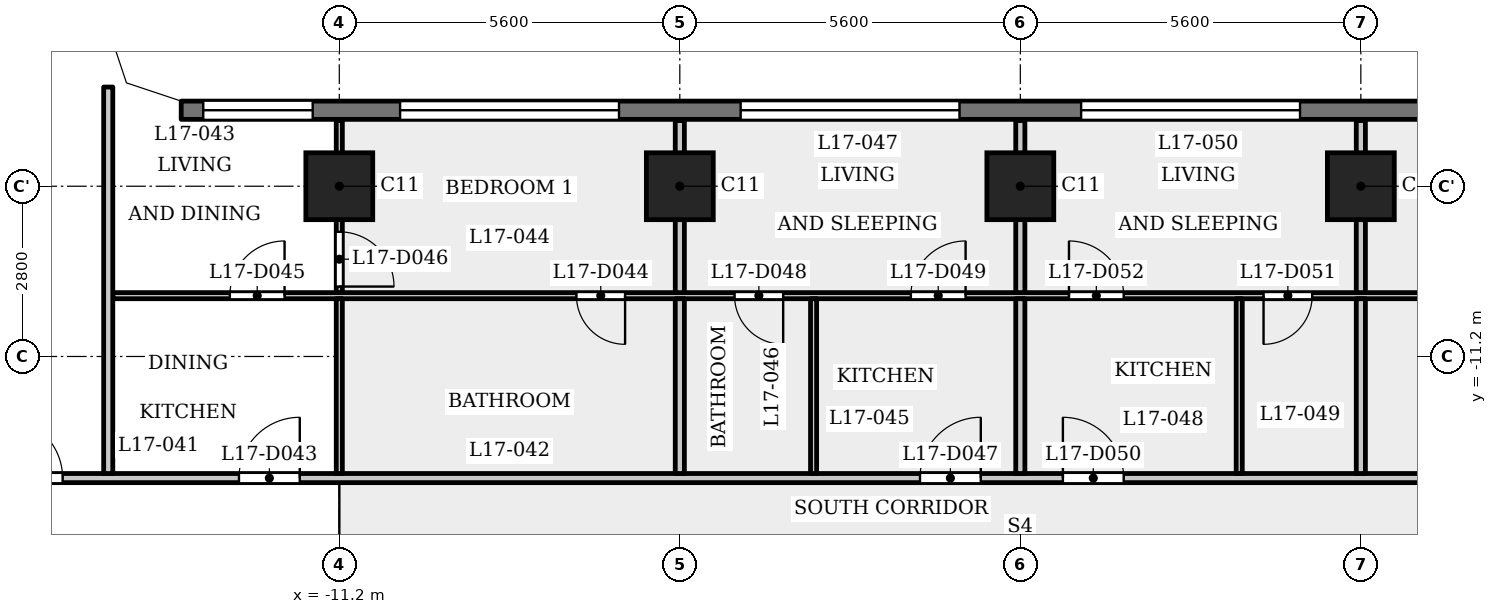
"""IFC4 building model, lengths in metres.
Left out: names, types, materials, properties, quantities, classifications, styles, units other than length and angle.
Written with IfcOpenShell. Run it as: python <this file> out.ifc"""

import sys

from ifc_helpers import new_model, si_unit, direction, frame, frame_2d, origin, origin_2d, place, context, subcontext, project, spatial, polyline, rectangle, outline, extrude, element, fill, save


model = new_model("IFC4")
c1 = context("Model", 3, precision=1e-05, world=origin(), true_north=direction((0.0, 1.0)))
c2 = subcontext(c1, "Body", "Model", "MODEL_VIEW")
j1 = project(units=[si_unit("LENGTHUNIT", "METRE"), si_unit("PLANEANGLEUNIT", "RADIAN")], contexts=[c1])
p1 = place(None, origin())
s1 = spatial("IfcSite", under=j1, at=p1, CompositionType="ELEMENT")
p2 = place(p1, origin())
s2 = spatial("IfcBuilding", under=s1, at=p2, CompositionType="ELEMENT")
p3 = place(p2, frame((0.0, 0.0, 69.0)))
s3 = spatial("IfcBuildingStorey", under=s2, at=p3, CompositionType="ELEMENT", Elevation=69.0)
for number, where, z_axis, x_axis in (
    (1, (-11.2, -8.4, 0.0), (0.0, 0.0, 1.0), (1.0, 0.0, 0.0)),
    (2, (-5.6, -8.4, 0.0), (0.0, 0.0, 1.0), (1.0, 0.0, 0.0)),
    (3, (0.0, -8.4, 0.0), (0.0, 0.0, 1.0), (1.0, 0.0, 0.0)),
    (4, (5.6, -8.4, 0.0), (0.0, 0.0, 1.0), (1.0, 0.0, 0.0)),
):
    element("IfcColumn", number, at=place(p3, frame(where, z_axis=z_axis, x_axis=x_axis)), inside=s3, PredefinedType="COLUMN", context=c2, shape_type="SweptSolid", body=[
        extrude(rectangle(XDim=1.1, YDim=1.1, at=origin_2d()), origin(), (0.0, 0.0, 1.0), 3.5),
    ])
p4 = place(p3, frame((13.8, -7.15, 0.0), z_axis=(0.0, 0.0, 1.0), x_axis=(-1.0, 0.0, 0.0)))
e5 = element("IfcWall", 5, at=p4, inside=s3, PredefinedType="SOLIDWALL", context=c2, shape_type="SweptSolid", body=[
    extrude(rectangle(XDim=27.6, YDim=0.3, at=frame_2d((13.8, 0.0))), origin(), (0.0, 0.0, 1.0), 3.15),
])
p5 = place(p4, frame((0.363, 0.0, 0.9)))
e6 = element("IfcOpeningElement", 6, at=p5, cuts=e5, PredefinedType="OPENING", context=c2, shape_type="SweptSolid", body=[
    extrude(rectangle(XDim=1.8, YDim=1.25, at=frame_2d((0.9, 0.625))), frame((0.0, 0.16, 0.0), z_axis=(0.0, -1.0, 0.0), x_axis=(1.0, 0.0, 0.0)), (0.0, 0.0, 1.0), 0.32),
])
p6 = place(p4, frame((3.6, 0.0, 1.2)))
e7 = element("IfcOpeningElement", 7, at=p6, cuts=e5, PredefinedType="OPENING", context=c2, shape_type="SweptSolid", body=[
    extrude(rectangle(XDim=3.6, YDim=0.95, at=frame_2d((1.8, 0.475))), frame((0.0, 0.16, 0.0), z_axis=(0.0, -1.0, 0.0), x_axis=(1.0, 0.0, 0.0)), (0.0, 0.0, 1.0), 0.32),
])
p7 = place(p4, frame((9.2, 0.0, 1.2)))
e8 = element("IfcOpeningElement", 8, at=p7, cuts=e5, PredefinedType="OPENING", context=c2, shape_type="SweptSolid", body=[
    extrude(rectangle(XDim=3.6, YDim=0.95, at=frame_2d((1.8, 0.475))), frame((0.0, 0.16, 0.0), z_axis=(0.0, -1.0, 0.0), x_axis=(1.0, 0.0, 0.0)), (0.0, 0.0, 1.0), 0.32),
])
p8 = place(p4, frame((14.8, 0.0, 1.2)))
e9 = element("IfcOpeningElement", 9, at=p8, cuts=e5, PredefinedType="OPENING", context=c2, shape_type="SweptSolid", body=[
    extrude(rectangle(XDim=3.6, YDim=0.95, at=frame_2d((1.8, 0.475))), frame((0.0, 0.16, 0.0), z_axis=(0.0, -1.0, 0.0), x_axis=(1.0, 0.0, 0.0)), (0.0, 0.0, 1.0), 0.32),
])
p9 = place(p4, frame((20.4, 0.0, 1.2)))
e10 = element("IfcOpeningElement", 10, at=p9, cuts=e5, PredefinedType="OPENING", context=c2, shape_type="SweptSolid", body=[
    extrude(rectangle(XDim=3.6, YDim=0.95, at=frame_2d((1.8, 0.475))), frame((0.0, 0.16, 0.0), z_axis=(0.0, -1.0, 0.0), x_axis=(1.0, 0.0, 0.0)), (0.0, 0.0, 1.0), 0.32),
])
p10 = place(p4, frame((25.438, 0.0, 0.9)))
e11 = element("IfcOpeningElement", 11, at=p10, cuts=e5, PredefinedType="OPENING", context=c2, shape_type="SweptSolid", body=[
    extrude(rectangle(XDim=1.8, YDim=1.25, at=frame_2d((0.9, 0.625))), frame((0.0, 0.16, 0.0), z_axis=(0.0, -1.0, 0.0), x_axis=(1.0, 0.0, 0.0)), (0.0, 0.0, 1.0), 0.32),
])
p11 = place(p3, frame((-17.4, -13.2, 0.0), z_axis=(0.0, 0.0, 1.0), x_axis=(1.0, 0.0, 0.0)))
e12 = element("IfcWall", 12, at=p11, inside=s3, PredefinedType="PARTITIONING", context=c2, shape_type="SweptSolid", body=[
    extrude(rectangle(XDim=34.8, YDim=0.15, at=frame_2d((17.4, 0.0))), origin(), (0.0, 0.0, 1.0), 3.15),
])
p12 = place(p11, frame((0.65, 0.0, 0.0)))
e13 = element("IfcOpeningElement", 13, at=p12, cuts=e12, PredefinedType="OPENING", context=c2, shape_type="SweptSolid", body=[
    extrude(rectangle(XDim=1.0, YDim=2.1, at=frame_2d((0.5, 1.05))), frame((0.0, 0.085, 0.0), z_axis=(0.0, -1.0, 0.0), x_axis=(1.0, 0.0, 0.0)), (0.0, 0.0, 1.0), 0.17),
])
p13 = place(p11, frame((33.05, 0.0, 0.0)))
e14 = element("IfcOpeningElement", 14, at=p13, cuts=e12, PredefinedType="OPENING", context=c2, shape_type="SweptSolid", body=[
    extrude(rectangle(XDim=1.0, YDim=2.1, at=frame_2d((0.5, 1.05))), frame((0.0, 0.085, 0.0), z_axis=(0.0, -1.0, 0.0), x_axis=(1.0, 0.0, 0.0)), (0.0, 0.0, 1.0), 0.17),
])
p14 = place(p11, frame((4.55, 0.0, 0.0)))
e15 = element("IfcOpeningElement", 15, at=p14, cuts=e12, PredefinedType="OPENING", context=c2, shape_type="SweptSolid", body=[
    extrude(rectangle(XDim=1.0, YDim=2.1, at=frame_2d((0.5, 1.05))), frame((0.0, 0.085, 0.0), z_axis=(0.0, -1.0, 0.0), x_axis=(1.0, 0.0, 0.0)), (0.0, 0.0, 1.0), 0.17),
])
p15 = place(p11, frame((15.75, 0.0, 0.0)))
e16 = element("IfcOpeningElement", 16, at=p15, cuts=e12, PredefinedType="OPENING", context=c2, shape_type="SweptSolid", body=[
    extrude(rectangle(XDim=1.0, YDim=2.1, at=frame_2d((0.5, 1.05))), frame((0.0, 0.085, 0.0), z_axis=(0.0, -1.0, 0.0), x_axis=(1.0, 0.0, 0.0)), (0.0, 0.0, 1.0), 0.17),
])
p16 = place(p11, frame((18.1, 0.0, 0.0)))
e17 = element("IfcOpeningElement", 17, at=p16, cuts=e12, PredefinedType="OPENING", context=c2, shape_type="SweptSolid", body=[
    extrude(rectangle(XDim=1.0, YDim=2.1, at=frame_2d((0.5, 1.05))), frame((0.0, 0.085, 0.0), z_axis=(0.0, -1.0, 0.0), x_axis=(1.0, 0.0, 0.0)), (0.0, 0.0, 1.0), 0.17),
])
p17 = place(p11, frame((26.95, 0.0, 0.0)))
e18 = element("IfcOpeningElement", 18, at=p17, cuts=e12, PredefinedType="OPENING", context=c2, shape_type="SweptSolid", body=[
    extrude(rectangle(XDim=1.0, YDim=2.1, at=frame_2d((0.5, 1.05))), frame((0.0, 0.085, 0.0), z_axis=(0.0, -1.0, 0.0), x_axis=(1.0, 0.0, 0.0)), (0.0, 0.0, 1.0), 0.17),
])
p18 = place(p3, frame((-14.925, -10.2, 0.0), z_axis=(0.0, 0.0, 1.0), x_axis=(1.0, 0.0, 0.0)))
e19 = element("IfcWall", 19, at=p18, inside=s3, PredefinedType="PARTITIONING", context=c2, shape_type="SweptSolid", body=[
    extrude(rectangle(XDim=29.85, YDim=0.1, at=frame_2d((14.925, 0.0))), origin(), (0.0, 0.0, 1.0), 3.15),
])
p19 = place(p18, frame((7.625, 0.0, 0.0)))
e20 = element("IfcOpeningElement", 20, at=p19, cuts=e19, PredefinedType="OPENING", context=c2, shape_type="SweptSolid", body=[
    extrude(rectangle(XDim=0.8, YDim=2.1, at=frame_2d((0.4, 1.05))), frame((0.0, 0.06, 0.0), z_axis=(0.0, -1.0, 0.0), x_axis=(1.0, 0.0, 0.0)), (0.0, 0.0, 1.0), 0.12),
])
p20 = place(p18, frame((1.925, 0.0, 0.0)))
e21 = element("IfcOpeningElement", 21, at=p20, cuts=e19, PredefinedType="OPENING", context=c2, shape_type="SweptSolid", body=[
    extrude(rectangle(XDim=0.9, YDim=2.1, at=frame_2d((0.45, 1.05))), frame((0.0, 0.06, 0.0), z_axis=(0.0, -1.0, 0.0), x_axis=(1.0, 0.0, 0.0)), (0.0, 0.0, 1.0), 0.12),
])
p21 = place(p18, frame((10.225, 0.0, 0.0)))
e22 = element("IfcOpeningElement", 22, at=p21, cuts=e19, PredefinedType="OPENING", context=c2, shape_type="SweptSolid", body=[
    extrude(rectangle(XDim=0.8, YDim=2.1, at=frame_2d((0.4, 1.05))), frame((0.0, 0.06, 0.0), z_axis=(0.0, -1.0, 0.0), x_axis=(1.0, 0.0, 0.0)), (0.0, 0.0, 1.0), 0.12),
])
p22 = place(p18, frame((13.125, 0.0, 0.0)))
e23 = element("IfcOpeningElement", 23, at=p22, cuts=e19, PredefinedType="OPENING", context=c2, shape_type="SweptSolid", body=[
    extrude(rectangle(XDim=0.9, YDim=2.1, at=frame_2d((0.45, 1.05))), frame((0.0, 0.06, 0.0), z_axis=(0.0, -1.0, 0.0), x_axis=(1.0, 0.0, 0.0)), (0.0, 0.0, 1.0), 0.12),
])
p23 = place(p18, frame((18.925, 0.0, 0.0)))
e24 = element("IfcOpeningElement", 24, at=p23, cuts=e19, PredefinedType="OPENING", context=c2, shape_type="SweptSolid", body=[
    extrude(rectangle(XDim=0.8, YDim=2.1, at=frame_2d((0.4, 1.05))), frame((0.0, 0.06, 0.0), z_axis=(0.0, -1.0, 0.0), x_axis=(1.0, 0.0, 0.0)), (0.0, 0.0, 1.0), 0.12),
])
p24 = place(p18, frame((15.725, 0.0, 0.0)))
e25 = element("IfcOpeningElement", 25, at=p24, cuts=e19, PredefinedType="OPENING", context=c2, shape_type="SweptSolid", body=[
    extrude(rectangle(XDim=0.9, YDim=2.1, at=frame_2d((0.45, 1.05))), frame((0.0, 0.06, 0.0), z_axis=(0.0, -1.0, 0.0), x_axis=(1.0, 0.0, 0.0)), (0.0, 0.0, 1.0), 0.12),
])
p25 = place(p18, frame((28.525, 0.0, 0.0)))
e26 = element("IfcOpeningElement", 26, at=p25, cuts=e19, PredefinedType="OPENING", context=c2, shape_type="SweptSolid", body=[
    extrude(rectangle(XDim=0.8, YDim=2.1, at=frame_2d((0.4, 1.05))), frame((0.0, 0.06, 0.0), z_axis=(0.0, -1.0, 0.0), x_axis=(1.0, 0.0, 0.0)), (0.0, 0.0, 1.0), 0.12),
])
p26 = place(p18, frame((24.325, 0.0, 0.0)))
e27 = element("IfcOpeningElement", 27, at=p26, cuts=e19, PredefinedType="OPENING", context=c2, shape_type="SweptSolid", body=[
    extrude(rectangle(XDim=0.9, YDim=2.1, at=frame_2d((0.45, 1.05))), frame((0.0, 0.06, 0.0), z_axis=(0.0, -1.0, 0.0), x_axis=(1.0, 0.0, 0.0)), (0.0, 0.0, 1.0), 0.12),
])
p27 = place(p3, frame((-15.0, -13.125, 0.0), z_axis=(0.0, 0.0, 1.0), x_axis=(0.0, 1.0, 0.0)))
e28 = element("IfcWall", 28, at=p27, inside=s3, PredefinedType="PARTITIONING", context=c2, shape_type="SweptSolid", body=[
    extrude(rectangle(XDim=6.356, YDim=0.15, at=frame_2d((3.178, 0.0))), origin(), (0.0, 0.0, 1.0), 3.15),
])
p28 = place(p3, frame((-11.2, -13.125, 0.0), z_axis=(0.0, 0.0, 1.0), x_axis=(0.0, 1.0, 0.0)))
e29 = element("IfcWall", 29, at=p28, inside=s3, PredefinedType="PARTITIONING", context=c2, shape_type="SweptSolid", body=[
    extrude(rectangle(XDim=2.875, YDim=0.1, at=frame_2d((1.438, 0.0))), origin(), (0.0, 0.0, 1.0), 3.15),
])
p29 = place(p3, frame((-11.2, -10.15, 0.0), z_axis=(0.0, 0.0, 1.0), x_axis=(0.0, 1.0, 0.0)))
e30 = element("IfcWall", 30, at=p29, inside=s3, PredefinedType="PARTITIONING", context=c2, shape_type="SweptSolid", body=[
    extrude(rectangle(XDim=2.83, YDim=0.1, at=frame_2d((1.415, 0.0))), origin(), (0.0, 0.0, 1.0), 3.15),
])
p30 = place(p29, frame((0.1, 0.0, 0.0)))
e31 = element("IfcOpeningElement", 31, at=p30, cuts=e30, PredefinedType="OPENING", context=c2, shape_type="SweptSolid", body=[
    extrude(rectangle(XDim=0.9, YDim=2.1, at=frame_2d((0.45, 1.05))), frame((0.0, 0.06, 0.0), z_axis=(0.0, -1.0, 0.0), x_axis=(1.0, 0.0, 0.0)), (0.0, 0.0, 1.0), 0.12),
])
p31 = place(p3, frame((-5.6, -13.125, 0.0), z_axis=(0.0, 0.0, 1.0), x_axis=(0.0, 1.0, 0.0)))
e32 = element("IfcWall", 32, at=p31, inside=s3, PredefinedType="PARTITIONING", context=c2, shape_type="SweptSolid", body=[
    extrude(rectangle(XDim=2.875, YDim=0.15, at=frame_2d((1.438, 0.0))), origin(), (0.0, 0.0, 1.0), 3.15),
])
p32 = place(p3, frame((-5.6, -10.15, 0.0), z_axis=(0.0, 0.0, 1.0), x_axis=(0.0, 1.0, 0.0)))
e33 = element("IfcWall", 33, at=p32, inside=s3, PredefinedType="PARTITIONING", context=c2, shape_type="SweptSolid", body=[
    extrude(rectangle(XDim=2.83, YDim=0.15, at=frame_2d((1.415, 0.0))), origin(), (0.0, 0.0, 1.0), 3.15),
])
p33 = place(p3, frame((-3.4, -13.125, 0.0), z_axis=(0.0, 0.0, 1.0), x_axis=(0.0, 1.0, 0.0)))
e34 = element("IfcWall", 34, at=p33, inside=s3, PredefinedType="PARTITIONING", context=c2, shape_type="SweptSolid", body=[
    extrude(rectangle(XDim=2.875, YDim=0.1, at=frame_2d((1.438, 0.0))), origin(), (0.0, 0.0, 1.0), 3.15),
])
p34 = place(p3, frame((0.0, -13.125, 0.0), z_axis=(0.0, 0.0, 1.0), x_axis=(0.0, 1.0, 0.0)))
e35 = element("IfcWall", 35, at=p34, inside=s3, PredefinedType="PARTITIONING", context=c2, shape_type="SweptSolid", body=[
    extrude(rectangle(XDim=2.875, YDim=0.15, at=frame_2d((1.438, 0.0))), origin(), (0.0, 0.0, 1.0), 3.15),
])
p35 = place(p3, frame((0.0, -10.15, 0.0), z_axis=(0.0, 0.0, 1.0), x_axis=(0.0, 1.0, 0.0)))
e36 = element("IfcWall", 36, at=p35, inside=s3, PredefinedType="PARTITIONING", context=c2, shape_type="SweptSolid", body=[
    extrude(rectangle(XDim=2.83, YDim=0.15, at=frame_2d((1.415, 0.0))), origin(), (0.0, 0.0, 1.0), 3.15),
])
p36 = place(p3, frame((3.6, -13.125, 0.0), z_axis=(0.0, 0.0, 1.0), x_axis=(0.0, 1.0, 0.0)))
e37 = element("IfcWall", 37, at=p36, inside=s3, PredefinedType="PARTITIONING", context=c2, shape_type="SweptSolid", body=[
    extrude(rectangle(XDim=2.875, YDim=0.1, at=frame_2d((1.438, 0.0))), origin(), (0.0, 0.0, 1.0), 3.15),
])
p37 = place(p3, frame((5.6, -13.125, 0.0), z_axis=(0.0, 0.0, 1.0), x_axis=(0.0, 1.0, 0.0)))
e38 = element("IfcWall", 38, at=p37, inside=s3, PredefinedType="PARTITIONING", context=c2, shape_type="SweptSolid", body=[
    extrude(rectangle(XDim=2.875, YDim=0.15, at=frame_2d((1.438, 0.0))), origin(), (0.0, 0.0, 1.0), 3.15),
])
p38 = place(p3, frame((5.6, -10.15, 0.0), z_axis=(0.0, 0.0, 1.0), x_axis=(0.0, 1.0, 0.0)))
e39 = element("IfcWall", 39, at=p38, inside=s3, PredefinedType="PARTITIONING", context=c2, shape_type="SweptSolid", body=[
    extrude(rectangle(XDim=2.83, YDim=0.15, at=frame_2d((1.415, 0.0))), origin(), (0.0, 0.0, 1.0), 3.15),
])
p39 = place(p3, origin())
e40 = element("IfcWall", 40, at=p39, inside=s3, PredefinedType="SOLIDWALL", context=c2, shape_type="SweptSolid", body=[
    extrude(outline(polyline([(-14.937, -6.937), (-13.849, -7.3), (-13.8, -7.3), (-13.8, -7.0), (-14.7, -6.7), (-15.0, -5.8), (-15.3, -5.8), (-15.3, -5.849), (-14.937, -6.937)])), origin(), (0.0, 0.0, 1.0), 3.15),
])
p40 = place(p12, origin())
e41 = element("IfcDoor", 41, at=p40, inside=s3, OperationType="SINGLE_SWING_RIGHT", PredefinedType="DOOR", context=c2, shape_type="SweptSolid", body=[
    extrude(rectangle(XDim=1.0, YDim=2.1, at=frame_2d((0.5, 1.05))), frame((0.0, 0.025, 0.0), z_axis=(0.0, -1.0, 0.0), x_axis=(1.0, 0.0, 0.0)), (0.0, 0.0, 1.0), 0.05),
])
fill(e13, e41)
p41 = place(p14, origin())
e42 = element("IfcDoor", 42, at=p41, inside=s3, OperationType="SINGLE_SWING_LEFT", PredefinedType="DOOR", context=c2, shape_type="SweptSolid", body=[
    extrude(rectangle(XDim=1.0, YDim=2.1, at=frame_2d((0.5, 1.05))), frame((0.0, 0.025, 0.0), z_axis=(0.0, -1.0, 0.0), x_axis=(1.0, 0.0, 0.0)), (0.0, 0.0, 1.0), 0.05),
])
fill(e15, e42)
p42 = place(p19, origin())
e43 = element("IfcDoor", 43, at=p42, inside=s3, OperationType="SINGLE_SWING_RIGHT", PredefinedType="DOOR", context=c2, shape_type="SweptSolid", body=[
    extrude(rectangle(XDim=0.8, YDim=2.1, at=frame_2d((0.4, 1.05))), frame((0.0, 0.025, 0.0), z_axis=(0.0, -1.0, 0.0), x_axis=(1.0, 0.0, 0.0)), (0.0, 0.0, 1.0), 0.05),
])
fill(e20, e43)
p43 = place(p20, origin())
e44 = element("IfcDoor", 44, at=p43, inside=s3, OperationType="SINGLE_SWING_LEFT", PredefinedType="DOOR", context=c2, shape_type="SweptSolid", body=[
    extrude(rectangle(XDim=0.9, YDim=2.1, at=frame_2d((0.45, 1.05))), frame((0.0, 0.025, 0.0), z_axis=(0.0, -1.0, 0.0), x_axis=(1.0, 0.0, 0.0)), (0.0, 0.0, 1.0), 0.05),
])
fill(e21, e44)
p44 = place(p30, origin())
e45 = element("IfcDoor", 45, at=p44, inside=s3, OperationType="SINGLE_SWING_LEFT", PredefinedType="DOOR", context=c2, shape_type="SweptSolid", body=[
    extrude(rectangle(XDim=0.9, YDim=2.1, at=frame_2d((0.45, 1.05))), frame((0.0, 0.025, 0.0), z_axis=(0.0, -1.0, 0.0), x_axis=(1.0, 0.0, 0.0)), (0.0, 0.0, 1.0), 0.05),
])
fill(e31, e45)
p45 = place(p15, origin())
e46 = element("IfcDoor", 46, at=p45, inside=s3, OperationType="SINGLE_SWING_LEFT", PredefinedType="DOOR", context=c2, shape_type="SweptSolid", body=[
    extrude(rectangle(XDim=1.0, YDim=2.1, at=frame_2d((0.5, 1.05))), frame((0.0, 0.025, 0.0), z_axis=(0.0, -1.0, 0.0), x_axis=(1.0, 0.0, 0.0)), (0.0, 0.0, 1.0), 0.05),
])
fill(e16, e46)
p46 = place(p21, origin())
e47 = element("IfcDoor", 47, at=p46, inside=s3, OperationType="SINGLE_SWING_RIGHT", PredefinedType="DOOR", context=c2, shape_type="SweptSolid", body=[
    extrude(rectangle(XDim=0.8, YDim=2.1, at=frame_2d((0.4, 1.05))), frame((0.0, 0.025, 0.0), z_axis=(0.0, -1.0, 0.0), x_axis=(1.0, 0.0, 0.0)), (0.0, 0.0, 1.0), 0.05),
])
fill(e22, e47)
p47 = place(p22, origin())
e48 = element("IfcDoor", 48, at=p47, inside=s3, OperationType="SINGLE_SWING_LEFT", PredefinedType="DOOR", context=c2, shape_type="SweptSolid", body=[
    extrude(rectangle(XDim=0.9, YDim=2.1, at=frame_2d((0.45, 1.05))), frame((0.0, 0.025, 0.0), z_axis=(0.0, -1.0, 0.0), x_axis=(1.0, 0.0, 0.0)), (0.0, 0.0, 1.0), 0.05),
])
fill(e23, e48)
p48 = place(p16, origin())
e49 = element("IfcDoor", 49, at=p48, inside=s3, OperationType="SINGLE_SWING_RIGHT", PredefinedType="DOOR", context=c2, shape_type="SweptSolid", body=[
    extrude(rectangle(XDim=1.0, YDim=2.1, at=frame_2d((0.5, 1.05))), frame((0.0, 0.025, 0.0), z_axis=(0.0, -1.0, 0.0), x_axis=(1.0, 0.0, 0.0)), (0.0, 0.0, 1.0), 0.05),
])
fill(e17, e49)
p49 = place(p23, origin())
e50 = element("IfcDoor", 50, at=p49, inside=s3, OperationType="SINGLE_SWING_LEFT", PredefinedType="DOOR", context=c2, shape_type="SweptSolid", body=[
    extrude(rectangle(XDim=0.8, YDim=2.1, at=frame_2d((0.4, 1.05))), frame((0.0, 0.025, 0.0), z_axis=(0.0, -1.0, 0.0), x_axis=(1.0, 0.0, 0.0)), (0.0, 0.0, 1.0), 0.05),
])
fill(e24, e50)
p50 = place(p24, origin())
e51 = element("IfcDoor", 51, at=p50, inside=s3, OperationType="SINGLE_SWING_RIGHT", PredefinedType="DOOR", context=c2, shape_type="SweptSolid", body=[
    extrude(rectangle(XDim=0.9, YDim=2.1, at=frame_2d((0.45, 1.05))), frame((0.0, 0.025, 0.0), z_axis=(0.0, -1.0, 0.0), x_axis=(1.0, 0.0, 0.0)), (0.0, 0.0, 1.0), 0.05),
])
fill(e25, e51)
p51 = place(p7, origin())
e52 = element("IfcWindow", 52, at=p51, inside=s3, PartitioningType="SINGLE_PANEL", PredefinedType="WINDOW", context=c2, shape_type="SweptSolid", body=[
    extrude(rectangle(XDim=3.6, YDim=0.95, at=frame_2d((1.8, 0.475))), frame((0.0, 0.03, 0.0), z_axis=(0.0, -1.0, 0.0), x_axis=(1.0, 0.0, 0.0)), (0.0, 0.0, 1.0), 0.06),
])
fill(e8, e52)
p52 = place(p8, origin())
e53 = element("IfcWindow", 53, at=p52, inside=s3, PartitioningType="SINGLE_PANEL", PredefinedType="WINDOW", context=c2, shape_type="SweptSolid", body=[
    extrude(rectangle(XDim=3.6, YDim=0.95, at=frame_2d((1.8, 0.475))), frame((0.0, 0.03, 0.0), z_axis=(0.0, -1.0, 0.0), x_axis=(1.0, 0.0, 0.0)), (0.0, 0.0, 1.0), 0.06),
])
fill(e9, e53)
p53 = place(p9, origin())
e54 = element("IfcWindow", 54, at=p53, inside=s3, PartitioningType="SINGLE_PANEL", PredefinedType="WINDOW", context=c2, shape_type="SweptSolid", body=[
    extrude(rectangle(XDim=3.6, YDim=0.95, at=frame_2d((1.8, 0.475))), frame((0.0, 0.03, 0.0), z_axis=(0.0, -1.0, 0.0), x_axis=(1.0, 0.0, 0.0)), (0.0, 0.0, 1.0), 0.06),
])
fill(e10, e54)
p54 = place(p10, origin())
e55 = element("IfcWindow", 55, at=p54, inside=s3, PartitioningType="SINGLE_PANEL", PredefinedType="WINDOW", context=c2, shape_type="SweptSolid", body=[
    extrude(rectangle(XDim=1.8, YDim=1.25, at=frame_2d((0.9, 0.625))), frame((0.0, 0.03, 0.0), z_axis=(0.0, -1.0, 0.0), x_axis=(1.0, 0.0, 0.0)), (0.0, 0.0, 1.0), 0.06),
])
fill(e11, e55)
save(model, sys.argv[1])
